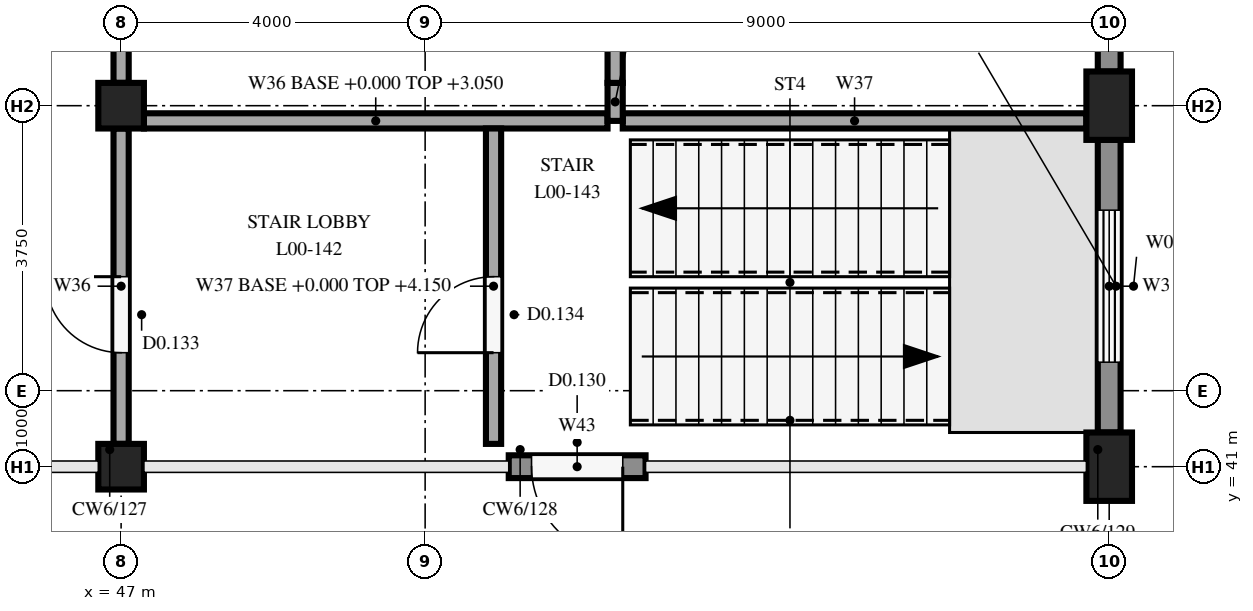
"""IFC4 building model, lengths in metres.
Left out: names, types, materials, properties, quantities, classifications, styles, units other than length and angle.
Written with IfcOpenShell. Run it as: python <this file> out.ifc"""

import sys

from ifc_helpers import new_model, si_unit, direction, frame, frame_2d, origin, origin_2d, place, context, subcontext, project, spatial, rectangle, extrude, element, fill, save


model = new_model("IFC4")
c1 = context("Model", 3, precision=1e-05, world=origin(), true_north=direction((0.0, 1.0)))
c2 = subcontext(c1, "Body", "Model", "MODEL_VIEW")
j1 = project(units=[si_unit("LENGTHUNIT", "METRE"), si_unit("PLANEANGLEUNIT", "RADIAN")], contexts=[c1])
p1 = place(None, origin())
s1 = spatial("IfcSite", under=j1, at=p1, CompositionType="ELEMENT")
p2 = place(p1, origin())
s2 = spatial("IfcBuilding", under=s1, at=p2, CompositionType="ELEMENT")
p3 = place(p2, origin())
s3 = spatial("IfcBuildingStorey", under=s2, at=p3, CompositionType="ELEMENT", Elevation=0.0)
for number, where, z_axis, x_axis in (
    (1, (60.0, 41.0, 0.0), (0.0, 0.0, 1.0), (1.0, 0.0, 0.0)),
    (2, (60.0, 45.75, 0.0), (0.0, 0.0, 1.0), (1.0, 0.0, 0.0)),
):
    element("IfcColumn", number, at=place(p3, frame(where, z_axis=z_axis, x_axis=x_axis)), inside=s3, PredefinedType="COLUMN", context=c2, shape_type="SweptSolid", body=[
        extrude(rectangle(XDim=0.6, YDim=0.9, at=origin_2d()), origin(), (0.0, 0.0, 1.0), 4.5),
    ])
for number, where, z_axis, x_axis in (
    (3, (47.0, 41.0, 0.0), (0.0, 0.0, 1.0), (1.0, 0.0, 0.0)),
    (4, (47.0, 45.75, 0.0), (0.0, 0.0, 1.0), (1.0, 0.0, 0.0)),
):
    element("IfcColumn", number, at=place(p3, frame(where, z_axis=z_axis, x_axis=x_axis)), inside=s3, PredefinedType="COLUMN", context=c2, shape_type="SweptSolid", body=[
        extrude(rectangle(XDim=0.6, YDim=0.6, at=origin_2d()), origin(), (0.0, 0.0, 1.0), 4.5),
    ])
p4 = place(p3, frame((60.0, 41.45, 0.0), z_axis=(0.0, 0.0, 1.0), x_axis=(0.0, 1.0, 0.0)))
e5 = element("IfcWall", 5, at=p4, inside=s3, PredefinedType="SOLIDWALL", context=c2, shape_type="SweptSolid", body=[
    extrude(rectangle(XDim=3.85, YDim=0.3, at=frame_2d((1.925, 0.0))), origin(), (0.0, 0.0, 1.0), 4.15),
])
p5 = place(p4, frame((0.925, 0.0, 1.0)))
e6 = element("IfcOpeningElement", 6, at=p5, cuts=e5, PredefinedType="OPENING", context=c2, shape_type="SweptSolid", body=[
    extrude(rectangle(XDim=2.0, YDim=2.0, at=frame_2d((1.0, 1.0))), frame((0.0, 0.16, 0.0), z_axis=(0.0, -1.0, 0.0), x_axis=(1.0, 0.0, 0.0)), (0.0, 0.0, 1.0), 0.32),
])
p6 = place(p3, frame((60.0, 46.2, 0.0), z_axis=(0.0, 0.0, 1.0), x_axis=(0.0, 1.0, 0.0)))
e7 = element("IfcWall", 7, at=p6, inside=s3, PredefinedType="SOLIDWALL", context=c2, shape_type="SweptSolid", body=[
    extrude(rectangle(XDim=3.85, YDim=0.3, at=frame_2d((1.925, 0.0))), origin(), (0.0, 0.0, 1.0), 4.15),
])
p7 = place(p6, frame((0.925, 0.0, 1.0)))
e8 = element("IfcOpeningElement", 8, at=p7, cuts=e7, PredefinedType="OPENING", context=c2, shape_type="SweptSolid", body=[
    extrude(rectangle(XDim=2.0, YDim=2.0, at=frame_2d((1.0, 1.0))), frame((0.0, 0.16, 0.0), z_axis=(0.0, -1.0, 0.0), x_axis=(1.0, 0.0, 0.0)), (0.0, 0.0, 1.0), 0.32),
])
p8 = place(p3, frame((52.1, 41.0, 0.0), z_axis=(0.0, 0.0, 1.0), x_axis=(1.0, 0.0, 0.0)))
e9 = element("IfcWall", 9, at=p8, inside=s3, PredefinedType="SOLIDWALL", context=c2, shape_type="SweptSolid", body=[
    extrude(rectangle(XDim=1.8, YDim=0.3, at=frame_2d((0.9, 0.0))), origin(), (0.0, 0.0, 1.0), 3.05),
])
p9 = place(p8, frame((0.3, 0.0, 0.0)))
e10 = element("IfcOpeningElement", 10, at=p9, cuts=e9, PredefinedType="OPENING", context=c2, shape_type="SweptSolid", body=[
    extrude(rectangle(XDim=1.2, YDim=2.1, at=frame_2d((0.6, 1.05))), frame((0.0, 0.16, 0.0), z_axis=(0.0, -1.0, 0.0), x_axis=(1.0, 0.0, 0.0)), (0.0, 0.0, 1.0), 0.32),
])
p10 = place(p3, frame((47.3, 45.55, 0.0), z_axis=(0.0, 0.0, 1.0), x_axis=(1.0, 0.0, 0.0)))
e11 = element("IfcWall", 11, at=p10, inside=s3, PredefinedType="PARTITIONING", context=c2, shape_type="SweptSolid", body=[
    extrude(rectangle(XDim=6.1, YDim=0.2, at=frame_2d((3.05, 0.0))), origin(), (0.0, 0.0, 1.0), 3.05),
])
p11 = place(p3, frame((53.6, 45.55, 0.0), z_axis=(0.0, 0.0, 1.0), x_axis=(1.0, 0.0, 0.0)))
e12 = element("IfcWall", 12, at=p11, inside=s3, PredefinedType="SOLIDWALL", context=c2, shape_type="SweptSolid", body=[
    extrude(rectangle(XDim=6.1, YDim=0.2, at=frame_2d((3.05, 0.0))), origin(), (0.0, 0.0, 1.0), 3.05),
])
p12 = place(p3, frame((47.0, 41.3, 0.0), z_axis=(0.0, 0.0, 1.0), x_axis=(0.0, 1.0, 0.0)))
e13 = element("IfcWall", 13, at=p12, inside=s3, PredefinedType="PARTITIONING", context=c2, shape_type="SweptSolid", body=[
    extrude(rectangle(XDim=4.15, YDim=0.2, at=frame_2d((2.075, 0.0))), origin(), (0.0, 0.0, 1.0), 4.15),
])
p13 = place(p12, frame((1.2, 0.0, 0.0)))
e14 = element("IfcOpeningElement", 14, at=p13, cuts=e13, PredefinedType="OPENING", context=c2, shape_type="SweptSolid", body=[
    extrude(rectangle(XDim=1.0, YDim=2.1, at=frame_2d((0.5, 1.05))), frame((0.0, 0.11, 0.0), z_axis=(0.0, -1.0, 0.0), x_axis=(1.0, 0.0, 0.0)), (0.0, 0.0, 1.0), 0.22),
])
p14 = place(p3, frame((47.0, 46.05, 0.0), z_axis=(0.0, 0.0, 1.0), x_axis=(0.0, 1.0, 0.0)))
e15 = element("IfcWall", 15, at=p14, inside=s3, PredefinedType="PARTITIONING", context=c2, shape_type="SweptSolid", body=[
    extrude(rectangle(XDim=4.15, YDim=0.2, at=frame_2d((2.075, 0.0))), origin(), (0.0, 0.0, 1.0), 4.15),
])
p15 = place(p3, frame((51.9, 41.3, 0.0), z_axis=(0.0, 0.0, 1.0), x_axis=(0.0, 1.0, 0.0)))
e16 = element("IfcWall", 16, at=p15, inside=s3, PredefinedType="SOLIDWALL", context=c2, shape_type="SweptSolid", body=[
    extrude(rectangle(XDim=4.15, YDim=0.2, at=frame_2d((2.075, 0.0))), origin(), (0.0, 0.0, 1.0), 4.15),
])
p16 = place(p15, frame((1.2, 0.0, 0.0)))
e17 = element("IfcOpeningElement", 17, at=p16, cuts=e16, PredefinedType="OPENING", context=c2, shape_type="SweptSolid", body=[
    extrude(rectangle(XDim=1.0, YDim=2.1, at=frame_2d((0.5, 1.05))), frame((0.0, 0.11, 0.0), z_axis=(0.0, -1.0, 0.0), x_axis=(1.0, 0.0, 0.0)), (0.0, 0.0, 1.0), 0.22),
])
p17 = place(p3, frame((53.5, 45.55, 0.0), z_axis=(0.0, 0.0, 1.0), x_axis=(0.0, 1.0, 0.0)))
e18 = element("IfcWall", 18, at=p17, inside=s3, PredefinedType="PARTITIONING", context=c2, shape_type="SweptSolid", body=[
    extrude(rectangle(XDim=0.5, YDim=0.2, at=frame_2d((0.25, 0.0))), origin(), (0.0, 0.0, 1.0), 3.05),
])
p18 = place(p3, frame((53.5, 46.05, 0.0), z_axis=(0.0, 0.0, 1.0), x_axis=(0.0, 1.0, 0.0)))
e19 = element("IfcWall", 19, at=p18, inside=s3, PredefinedType="PARTITIONING", context=c2, shape_type="SweptSolid", body=[
    extrude(rectangle(XDim=4.15, YDim=0.2, at=frame_2d((2.075, 0.0))), origin(), (0.0, 0.0, 1.0), 4.15),
])
p19 = place(p5, origin())
e20 = element("IfcWindow", 20, at=p19, inside=s3, PartitioningType="SINGLE_PANEL", PredefinedType="WINDOW", context=c2, shape_type="SweptSolid", body=[
    extrude(rectangle(XDim=2.0, YDim=2.0, at=frame_2d((1.0, 1.0))), frame((0.0, 0.03, 0.0), z_axis=(0.0, -1.0, 0.0), x_axis=(1.0, 0.0, 0.0)), (0.0, 0.0, 1.0), 0.06),
])
fill(e6, e20)
p20 = place(p9, frame((1.2, 0.0, 0.0), z_axis=(0.0, 0.0, 1.0), x_axis=(-1.0, 0.0, 0.0)))
e21 = element("IfcDoor", 21, at=p20, inside=s3, OperationType="SINGLE_SWING_RIGHT", PredefinedType="DOOR", context=c2, shape_type="SweptSolid", body=[
    extrude(rectangle(XDim=1.2, YDim=2.1, at=frame_2d((0.6, 1.05))), frame((0.0, 0.025, 0.0), z_axis=(0.0, -1.0, 0.0), x_axis=(1.0, 0.0, 0.0)), (0.0, 0.0, 1.0), 0.05),
])
fill(e10, e21)
p21 = place(p13, origin())
e22 = element("IfcDoor", 22, at=p21, inside=s3, OperationType="SINGLE_SWING_RIGHT", PredefinedType="DOOR", context=c2, shape_type="SweptSolid", body=[
    extrude(rectangle(XDim=1.0, YDim=2.1, at=frame_2d((0.5, 1.05))), frame((0.0, 0.025, 0.0), z_axis=(0.0, -1.0, 0.0), x_axis=(1.0, 0.0, 0.0)), (0.0, 0.0, 1.0), 0.05),
])
fill(e14, e22)
p22 = place(p16, origin())
e23 = element("IfcDoor", 23, at=p22, inside=s3, OperationType="SINGLE_SWING_LEFT", PredefinedType="DOOR", context=c2, shape_type="SweptSolid", body=[
    extrude(rectangle(XDim=1.0, YDim=2.1, at=frame_2d((0.5, 1.05))), frame((0.0, 0.025, 0.0), z_axis=(0.0, -1.0, 0.0), x_axis=(1.0, 0.0, 0.0)), (0.0, 0.0, 1.0), 0.05),
])
fill(e17, e23)
save(model, sys.argv[1])
